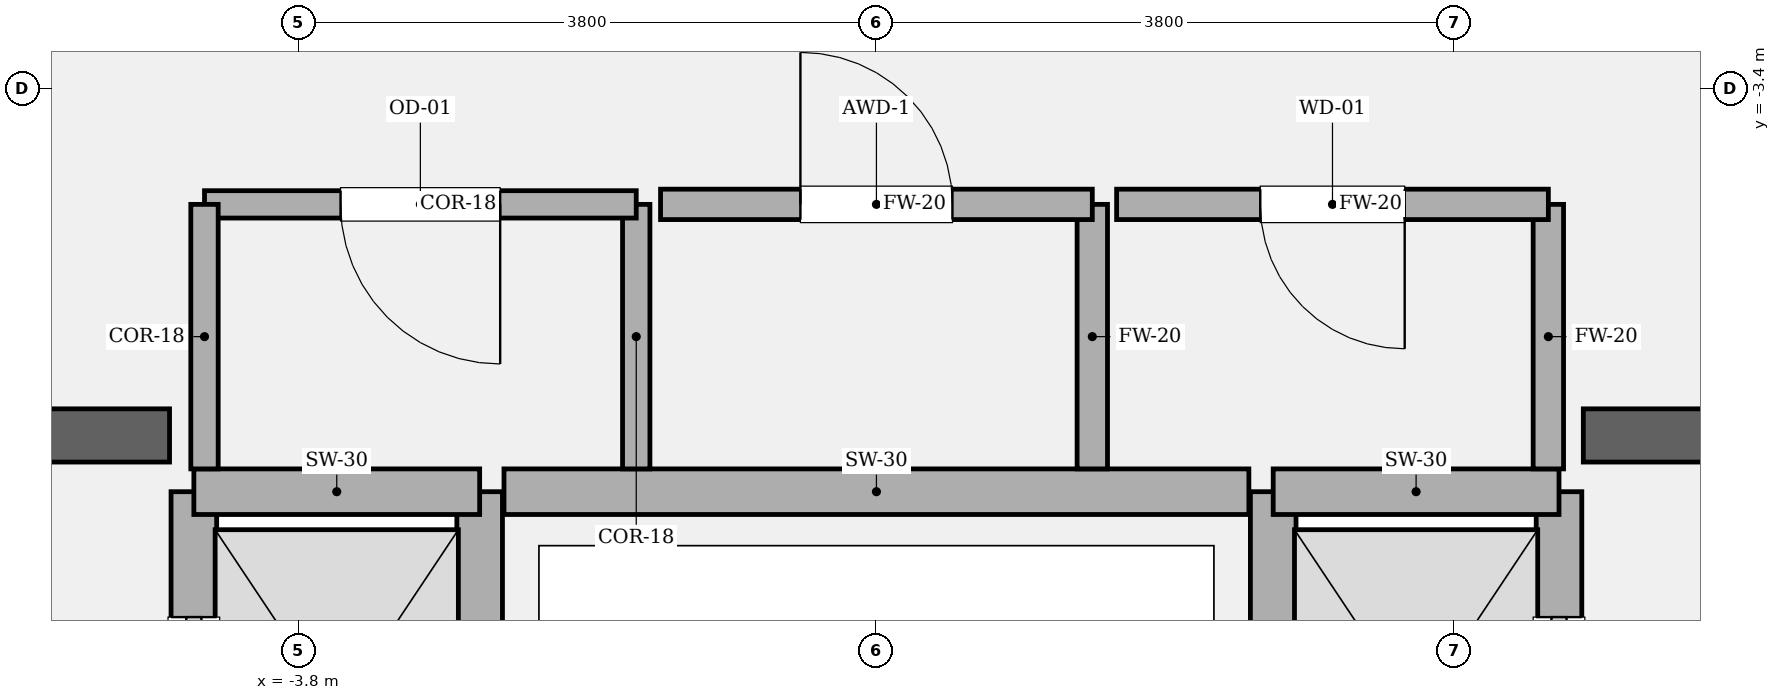
"""IFC4 building model, lengths in metres.
Left out: names, types, materials, properties, quantities, classifications, styles, units other than length and angle.
Written with IfcOpenShell. Run it as: python <this file> out.ifc"""

import sys

from ifc_helpers import new_model, si_unit, direction, frame, frame_2d, origin, place, context, subcontext, project, spatial, rectangle, extrude, element, fill, save


model = new_model("IFC4")
c1 = context("Model", 3, precision=1e-05, world=origin(), true_north=direction((0.0, 1.0)))
c2 = subcontext(c1, "Body", "Model", "MODEL_VIEW")
j1 = project(units=[si_unit("LENGTHUNIT", "METRE"), si_unit("PLANEANGLEUNIT", "RADIAN")], contexts=[c1])
p1 = place(None, origin())
s1 = spatial("IfcSite", under=j1, at=p1, CompositionType="ELEMENT")
p2 = place(p1, origin())
s2 = spatial("IfcBuilding", under=s1, at=p2, CompositionType="ELEMENT")
p3 = place(p2, frame((0.0, 0.0, 76.8)))
s3 = spatial("IfcBuildingStorey", under=s2, at=p3, CompositionType="ELEMENT", Elevation=76.8)
p4 = place(p3, frame((-9.825, -5.68, 0.0), z_axis=(0.0, 0.0, 1.0), x_axis=(1.0, 0.0, 0.0)))
e1 = element("IfcWall", 1, at=p4, inside=s3, PredefinedType="SOLIDWALL", context=c2, shape_type="SweptSolid", body=[
    extrude(rectangle(XDim=5.175, YDim=0.35, at=frame_2d((2.587, 0.0))), origin(), (0.0, 0.0, 1.0), 4.05),
])
p5 = place(p4, frame((1.285, 0.0, 0.0)))
e2 = element("IfcOpeningElement", 2, at=p5, cuts=e1, PredefinedType="OPENING", context=c2, shape_type="SweptSolid", body=[
    extrude(rectangle(XDim=1.18, YDim=2.2, at=frame_2d((0.59, 1.1))), frame((0.0, 0.185, 0.0), z_axis=(0.0, -1.0, 0.0), x_axis=(1.0, 0.0, 0.0)), (0.0, 0.0, 1.0), 0.37),
])
p6 = place(p3, frame((4.65, -5.68, 0.0), z_axis=(0.0, 0.0, 1.0), x_axis=(1.0, 0.0, 0.0)))
e3 = element("IfcWall", 3, at=p6, inside=s3, PredefinedType="SOLIDWALL", context=c2, shape_type="SweptSolid", body=[
    extrude(rectangle(XDim=5.175, YDim=0.35, at=frame_2d((2.587, 0.0))), origin(), (0.0, 0.0, 1.0), 4.05),
])
p7 = place(p6, frame((2.71, 0.0, 0.0)))
e4 = element("IfcOpeningElement", 4, at=p7, cuts=e3, PredefinedType="OPENING", context=c2, shape_type="SweptSolid", body=[
    extrude(rectangle(XDim=1.18, YDim=2.2, at=frame_2d((0.59, 1.1))), frame((0.0, 0.185, 0.0), z_axis=(0.0, -1.0, 0.0), x_axis=(1.0, 0.0, 0.0)), (0.0, 0.0, 1.0), 0.37),
])
p8 = place(p3, frame((-4.49, -8.82, 0.0), z_axis=(0.0, 0.0, 1.0), x_axis=(0.0, 1.0, 0.0)))
e5 = element("IfcWall", 5, at=p8, inside=s3, PredefinedType="SOLIDWALL", context=c2, shape_type="SweptSolid", body=[
    extrude(rectangle(XDim=2.77, YDim=0.3, at=frame_2d((1.385, 0.0))), origin(), (0.0, 0.0, 1.0), 3.81),
])
p9 = place(p8, frame((0.825, 0.0, 0.0)))
e6 = element("IfcOpeningElement", 6, at=p9, cuts=e5, PredefinedType="OPENING", context=c2, shape_type="SweptSolid", body=[
    extrude(rectangle(XDim=1.12, YDim=2.25, at=frame_2d((0.56, 1.125))), frame((0.0, 0.16, 0.0), z_axis=(0.0, -1.0, 0.0), x_axis=(1.0, 0.0, 0.0)), (0.0, 0.0, 1.0), 0.32),
])
p10 = place(p3, frame((-2.61, -8.82, 0.0), z_axis=(0.0, 0.0, 1.0), x_axis=(0.0, 1.0, 0.0)))
e7 = element("IfcWall", 7, at=p10, inside=s3, PredefinedType="SOLIDWALL", context=c2, shape_type="SweptSolid", body=[
    extrude(rectangle(XDim=2.77, YDim=0.3, at=frame_2d((1.385, 0.0))), origin(), (0.0, 0.0, 1.0), 3.81),
])
p11 = place(p3, frame((-4.49, -6.05, 0.0), z_axis=(0.0, 0.0, 1.0), x_axis=(1.0, 0.0, 0.0)))
e8 = element("IfcWall", 8, at=p11, inside=s3, PredefinedType="SOLIDWALL", context=c2, shape_type="SweptSolid", body=[
    extrude(rectangle(XDim=1.88, YDim=0.3, at=frame_2d((0.94, 0.0))), origin(), (0.0, 0.0, 1.0), 3.81),
])
p12 = place(p3, frame((4.49, -8.82, 0.0), z_axis=(0.0, 0.0, 1.0), x_axis=(0.0, 1.0, 0.0)))
e9 = element("IfcWall", 9, at=p12, inside=s3, PredefinedType="SOLIDWALL", context=c2, shape_type="SweptSolid", body=[
    extrude(rectangle(XDim=2.77, YDim=0.3, at=frame_2d((1.385, 0.0))), origin(), (0.0, 0.0, 1.0), 3.81),
])
p13 = place(p12, frame((0.825, 0.0, 0.0)))
e10 = element("IfcOpeningElement", 10, at=p13, cuts=e9, PredefinedType="OPENING", context=c2, shape_type="SweptSolid", body=[
    extrude(rectangle(XDim=1.12, YDim=2.25, at=frame_2d((0.56, 1.125))), frame((0.0, 0.16, 0.0), z_axis=(0.0, -1.0, 0.0), x_axis=(1.0, 0.0, 0.0)), (0.0, 0.0, 1.0), 0.32),
])
p14 = place(p3, frame((2.61, -8.82, 0.0), z_axis=(0.0, 0.0, 1.0), x_axis=(0.0, 1.0, 0.0)))
e11 = element("IfcWall", 11, at=p14, inside=s3, PredefinedType="SOLIDWALL", context=c2, shape_type="SweptSolid", body=[
    extrude(rectangle(XDim=2.77, YDim=0.3, at=frame_2d((1.385, 0.0))), origin(), (0.0, 0.0, 1.0), 3.81),
])
p15 = place(p3, frame((2.61, -6.05, 0.0), z_axis=(0.0, 0.0, 1.0), x_axis=(1.0, 0.0, 0.0)))
e12 = element("IfcWall", 12, at=p15, inside=s3, PredefinedType="SOLIDWALL", context=c2, shape_type="SweptSolid", body=[
    extrude(rectangle(XDim=1.88, YDim=0.3, at=frame_2d((0.94, 0.0))), origin(), (0.0, 0.0, 1.0), 3.81),
])
p16 = place(p3, frame((-2.45, -6.05, 0.0), z_axis=(0.0, 0.0, 1.0), x_axis=(1.0, 0.0, 0.0)))
e13 = element("IfcWall", 13, at=p16, inside=s3, PredefinedType="SOLIDWALL", context=c2, shape_type="SweptSolid", body=[
    extrude(rectangle(XDim=4.9, YDim=0.3, at=frame_2d((2.45, 0.0))), origin(), (0.0, 0.0, 1.0), 3.81),
])
p17 = place(p3, frame((-1.58, -5.9, 0.0), z_axis=(0.0, 0.0, 1.0), x_axis=(0.0, 1.0, 0.0)))
e14 = element("IfcWall", 14, at=p17, inside=s3, PredefinedType="PARTITIONING", context=c2, shape_type="SweptSolid", body=[
    extrude(rectangle(XDim=1.74, YDim=0.18, at=frame_2d((0.87, 0.0))), origin(), (0.0, 0.0, 1.0), 3.81),
])
p18 = place(p3, frame((-1.58, -4.16, 0.0), z_axis=(0.0, 0.0, 1.0), x_axis=(-1.0, 0.0, 0.0)))
e15 = element("IfcWall", 15, at=p18, inside=s3, PredefinedType="PARTITIONING", context=c2, shape_type="SweptSolid", body=[
    extrude(rectangle(XDim=2.84, YDim=0.18, at=frame_2d((1.42, 0.0))), origin(), (0.0, 0.0, 1.0), 3.81),
])
p19 = place(p18, frame((0.895, 0.0, 0.0)))
e16 = element("IfcOpeningElement", 16, at=p19, cuts=e15, PredefinedType="OPENING", context=c2, shape_type="SweptSolid", body=[
    extrude(rectangle(XDim=1.05, YDim=2.2, at=frame_2d((0.525, 1.1))), frame((0.0, 0.1, 0.0), z_axis=(0.0, -1.0, 0.0), x_axis=(1.0, 0.0, 0.0)), (0.0, 0.0, 1.0), 0.2),
])
p20 = place(p3, frame((-4.42, -4.16, 0.0), z_axis=(0.0, 0.0, 1.0), x_axis=(0.0, -1.0, 0.0)))
e17 = element("IfcWall", 17, at=p20, inside=s3, PredefinedType="PARTITIONING", context=c2, shape_type="SweptSolid", body=[
    extrude(rectangle(XDim=1.74, YDim=0.18, at=frame_2d((0.87, 0.0))), origin(), (0.0, 0.0, 1.0), 3.81),
])
p21 = place(p3, frame((1.42, -5.9, 0.0), z_axis=(0.0, 0.0, 1.0), x_axis=(0.0, 1.0, 0.0)))
e18 = element("IfcWall", 18, at=p21, inside=s3, PredefinedType="SOLIDWALL", context=c2, shape_type="SweptSolid", body=[
    extrude(rectangle(XDim=1.74, YDim=0.2, at=frame_2d((0.87, 0.0))), origin(), (0.0, 0.0, 1.0), 3.81),
])
p22 = place(p3, frame((1.42, -4.16, 0.0), z_axis=(0.0, 0.0, 1.0), x_axis=(-1.0, 0.0, 0.0)))
e19 = element("IfcWall", 19, at=p22, inside=s3, PredefinedType="SOLIDWALL", context=c2, shape_type="SweptSolid", body=[
    extrude(rectangle(XDim=2.84, YDim=0.2, at=frame_2d((1.42, 0.0))), origin(), (0.0, 0.0, 1.0), 3.81),
])
p23 = place(p22, frame((0.92, 0.0, 0.0)))
e20 = element("IfcOpeningElement", 20, at=p23, cuts=e19, PredefinedType="OPENING", context=c2, shape_type="SweptSolid", body=[
    extrude(rectangle(XDim=1.0, YDim=2.15, at=frame_2d((0.5, 1.075))), frame((0.0, 0.11, 0.0), z_axis=(0.0, -1.0, 0.0), x_axis=(1.0, 0.0, 0.0)), (0.0, 0.0, 1.0), 0.22),
])
p24 = place(p3, frame((4.42, -5.9, 0.0), z_axis=(0.0, 0.0, 1.0), x_axis=(0.0, 1.0, 0.0)))
e21 = element("IfcWall", 21, at=p24, inside=s3, PredefinedType="SOLIDWALL", context=c2, shape_type="SweptSolid", body=[
    extrude(rectangle(XDim=1.74, YDim=0.2, at=frame_2d((0.87, 0.0))), origin(), (0.0, 0.0, 1.0), 3.81),
])
p25 = place(p3, frame((4.42, -4.16, 0.0), z_axis=(0.0, 0.0, 1.0), x_axis=(-1.0, 0.0, 0.0)))
e22 = element("IfcWall", 22, at=p25, inside=s3, PredefinedType="SOLIDWALL", context=c2, shape_type="SweptSolid", body=[
    extrude(rectangle(XDim=2.84, YDim=0.2, at=frame_2d((1.42, 0.0))), origin(), (0.0, 0.0, 1.0), 3.81),
])
p26 = place(p25, frame((0.945, 0.0, 0.0)))
e23 = element("IfcOpeningElement", 23, at=p26, cuts=e22, PredefinedType="OPENING", context=c2, shape_type="SweptSolid", body=[
    extrude(rectangle(XDim=0.95, YDim=2.15, at=frame_2d((0.475, 1.075))), frame((0.0, 0.11, 0.0), z_axis=(0.0, -1.0, 0.0), x_axis=(1.0, 0.0, 0.0)), (0.0, 0.0, 1.0), 0.22),
])
p27 = place(p9, origin())
e24 = element("IfcDoor", 24, at=p27, inside=s3, OperationType="SLIDING_TO_LEFT", PredefinedType="DOOR", context=c2, shape_type="SweptSolid", body=[
    extrude(rectangle(XDim=1.12, YDim=2.25, at=frame_2d((0.56, 1.125))), frame((0.0, 0.025, 0.0), z_axis=(0.0, -1.0, 0.0), x_axis=(1.0, 0.0, 0.0)), (0.0, 0.0, 1.0), 0.05),
])
fill(e6, e24)
p28 = place(p13, origin())
e25 = element("IfcDoor", 25, at=p28, inside=s3, OperationType="SLIDING_TO_RIGHT", PredefinedType="DOOR", context=c2, shape_type="SweptSolid", body=[
    extrude(rectangle(XDim=1.12, YDim=2.25, at=frame_2d((0.56, 1.125))), frame((0.0, 0.025, 0.0), z_axis=(0.0, -1.0, 0.0), x_axis=(1.0, 0.0, 0.0)), (0.0, 0.0, 1.0), 0.05),
])
fill(e10, e25)
p29 = place(p19, origin())
e26 = element("IfcDoor", 26, at=p29, inside=s3, OperationType="SINGLE_SWING_LEFT", PredefinedType="DOOR", context=c2, shape_type="SweptSolid", body=[
    extrude(rectangle(XDim=1.05, YDim=2.2, at=frame_2d((0.525, 1.1))), frame((0.0, 0.025, 0.0), z_axis=(0.0, -1.0, 0.0), x_axis=(1.0, 0.0, 0.0)), (0.0, 0.0, 1.0), 0.05),
])
fill(e16, e26)
p30 = place(p23, origin())
e27 = element("IfcDoor", 27, at=p30, inside=s3, OperationType="SINGLE_SWING_RIGHT", PredefinedType="DOOR", context=c2, shape_type="SweptSolid", body=[
    extrude(rectangle(XDim=1.0, YDim=2.15, at=frame_2d((0.5, 1.075))), frame((0.0, 0.025, 0.0), z_axis=(0.0, -1.0, 0.0), x_axis=(1.0, 0.0, 0.0)), (0.0, 0.0, 1.0), 0.05),
])
fill(e20, e27)
p31 = place(p26, origin())
e28 = element("IfcDoor", 28, at=p31, inside=s3, OperationType="SINGLE_SWING_LEFT", PredefinedType="DOOR", context=c2, shape_type="SweptSolid", body=[
    extrude(rectangle(XDim=0.95, YDim=2.15, at=frame_2d((0.475, 1.075))), frame((0.0, 0.025, 0.0), z_axis=(0.0, -1.0, 0.0), x_axis=(1.0, 0.0, 0.0)), (0.0, 0.0, 1.0), 0.05),
])
fill(e23, e28)
save(model, sys.argv[1])
